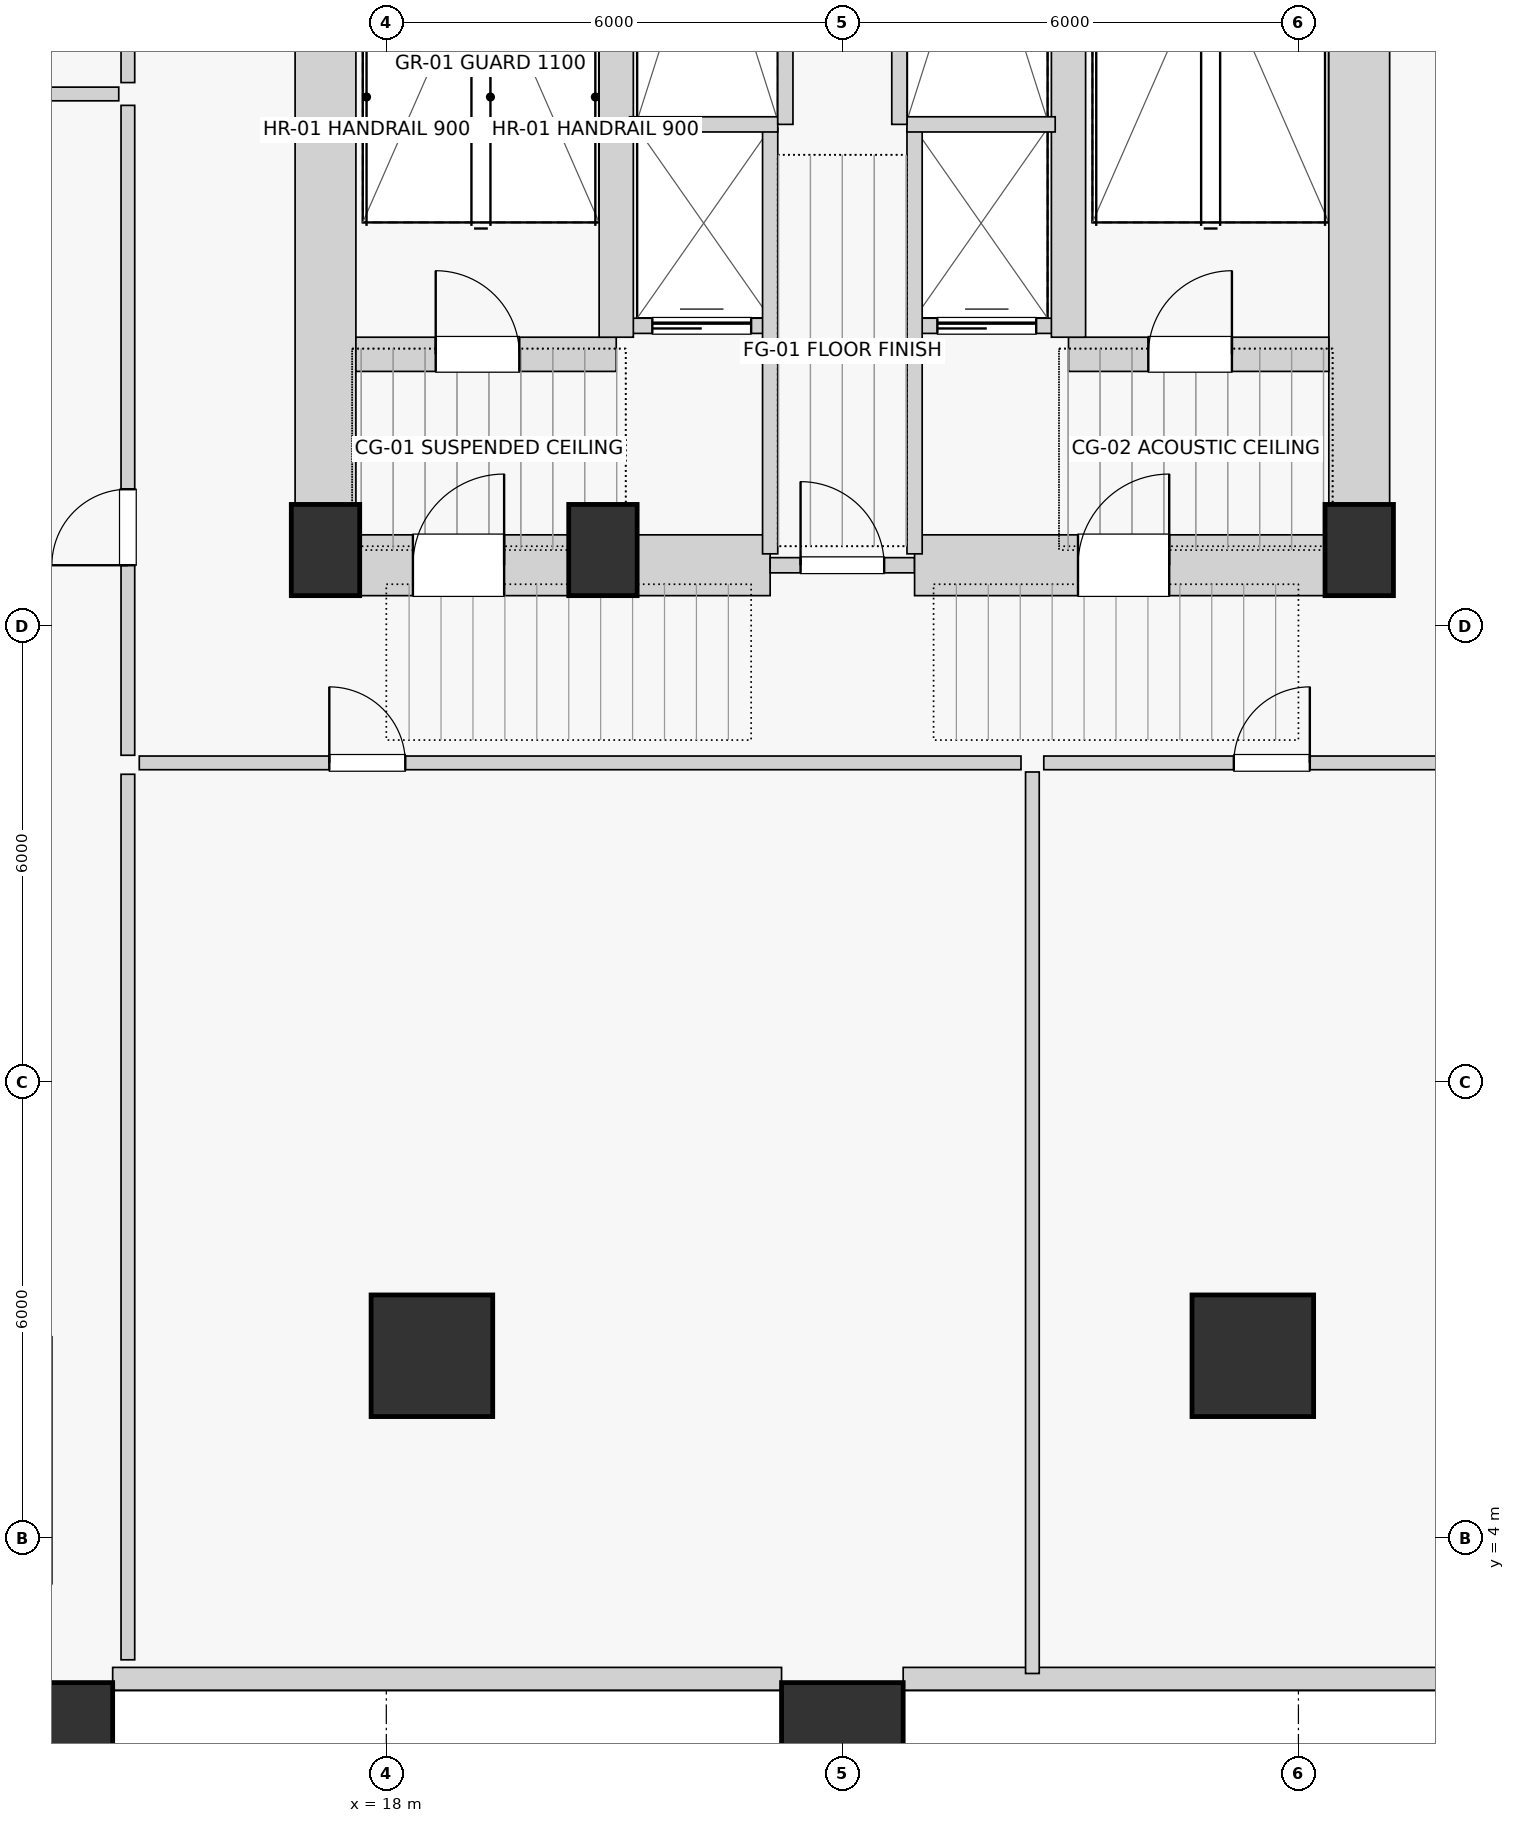
"""IFC4 building model, lengths in metres.
Left out: names, types, materials, properties, quantities, classifications, styles, units other than length and angle.
Written with IfcOpenShell. Run it as: python <this file> out.ifc"""

import sys

from ifc_helpers import new_model, si_unit, direction, frame, frame_2d, origin, origin_2d, place, context, subcontext, project, spatial, rectangle, extrude, source, transform, mapped, element, fill, save


model = new_model("IFC4")
c1 = context("Model", 3, precision=1e-05, world=origin(), true_north=direction((0.0, 1.0)))
c2 = subcontext(c1, "Body", "Model", "MODEL_VIEW")
j1 = project(units=[si_unit("LENGTHUNIT", "METRE"), si_unit("PLANEANGLEUNIT", "RADIAN")], contexts=[c1])
p1 = place(None, origin())
s1 = spatial("IfcSite", under=j1, at=p1, CompositionType="ELEMENT")
p2 = place(p1, origin())
s2 = spatial("IfcBuilding", under=s1, at=p2, CompositionType="ELEMENT")
p3 = place(p2, frame((0.0, 0.0, 18.4)))
s3 = spatial("IfcBuildingStorey", under=s2, at=p3, CompositionType="ELEMENT", Elevation=18.4)
for number, where, z_axis, x_axis in (
    (1, (17.2, 17.0, 0.0), (0.0, 0.0, 1.0), (1.0, 0.0, 0.0)),
    (2, (20.85, 17.0, 0.0), (0.0, 0.0, 1.0), (1.0, 0.0, 0.0)),
    (3, (30.8, 17.0, 0.0), (0.0, 0.0, 1.0), (1.0, 0.0, 0.0)),
):
    element("IfcColumn", number, at=place(p3, frame(where, z_axis=z_axis, x_axis=x_axis)), inside=s3, PredefinedType="PILASTER", context=c2, shape_type="SweptSolid", body=[
        extrude(rectangle(XDim=0.9, YDim=1.2, at=origin_2d()), origin(), (0.0, 0.0, 1.0), 4.4),
    ])
for number, where, z_axis, x_axis in (
    (4, (13.6, 1.3, 0.0), (0.0, 0.0, 1.0), (1.0, 0.0, 0.0)),
    (5, (24.0, 1.3, 0.0), (0.0, 0.0, 1.0), (1.0, 0.0, 0.0)),
    (6, (18.6, 6.4, 0.0), (0.0, 0.0, 1.0), (1.0, 0.0, 0.0)),
    (7, (29.4, 6.4, 0.0), (0.0, 0.0, 1.0), (1.0, 0.0, 0.0)),
):
    element("IfcColumn", number, at=place(p3, frame(where, z_axis=z_axis, x_axis=x_axis)), inside=s3, PredefinedType="COLUMN", context=c2, shape_type="SweptSolid", body=[
        extrude(rectangle(XDim=1.6, YDim=1.6, at=origin_2d()), origin(), (0.0, 0.0, 1.0), 4.4),
    ])
p4 = place(p3, frame((14.4, 2.15, 0.0), z_axis=(0.0, 0.0, 1.0), x_axis=(1.0, 0.0, 0.0)))
e8 = element("IfcWall", 8, at=p4, inside=s3, PredefinedType="SOLIDWALL", context=c2, shape_type="SweptSolid", body=[
    extrude(rectangle(XDim=8.8, YDim=0.3, at=frame_2d((4.4, 0.0))), origin(), (0.0, 0.0, 1.0), 2.95),
])
p5 = place(p4, frame((3.35, 0.0, 0.85)))
e9 = element("IfcOpeningElement", 9, at=p5, cuts=e8, PredefinedType="OPENING", context=c2, shape_type="SweptSolid", body=[
    extrude(rectangle(XDim=2.1, YDim=1.75, at=frame_2d((1.05, 0.875))), frame((0.0, 0.16, 0.0), z_axis=(0.0, -1.0, 0.0), x_axis=(1.0, 0.0, 0.0)), (0.0, 0.0, 1.0), 0.32),
])
p6 = place(p3, frame((24.8, 2.15, 0.0), z_axis=(0.0, 0.0, 1.0), x_axis=(1.0, 0.0, 0.0)))
e10 = element("IfcWall", 10, at=p6, inside=s3, PredefinedType="SOLIDWALL", context=c2, shape_type="SweptSolid", body=[
    extrude(rectangle(XDim=8.8, YDim=0.3, at=frame_2d((4.4, 0.0))), origin(), (0.0, 0.0, 1.0), 2.95),
])
p7 = place(p6, frame((3.35, 0.0, 0.85)))
e11 = element("IfcOpeningElement", 11, at=p7, cuts=e10, PredefinedType="OPENING", context=c2, shape_type="SweptSolid", body=[
    extrude(rectangle(XDim=2.1, YDim=1.75, at=frame_2d((1.05, 0.875))), frame((0.0, 0.16, 0.0), z_axis=(0.0, -1.0, 0.0), x_axis=(1.0, 0.0, 0.0)), (0.0, 0.0, 1.0), 0.32),
])
for number, where, z_axis, x_axis in (
    (12, (17.2, 16.8, 0.0), (0.0, 0.0, 1.0), (0.0, 1.0, 0.0)),
    (13, (30.8, 16.8, 0.0), (0.0, 0.0, 1.0), (0.0, 1.0, 0.0)),
):
    element("IfcWall", number, at=place(p3, frame(where, z_axis=z_axis, x_axis=x_axis)), inside=s3, PredefinedType="SHEAR", context=c2, shape_type="SweptSolid", body=[
        extrude(rectangle(XDim=14.2, YDim=0.8, at=frame_2d((7.1, 0.0))), origin(), (0.0, 0.0, 1.0), 4.05),
    ])
p8 = place(p3, frame((17.2, 16.8, 0.0), z_axis=(0.0, 0.0, 1.0), x_axis=(1.0, 0.0, 0.0)))
e14 = element("IfcWall", 14, at=p8, inside=s3, PredefinedType="SHEAR", context=c2, shape_type="SweptSolid", body=[
    extrude(rectangle(XDim=5.85, YDim=0.8, at=frame_2d((2.925, 0.0))), origin(), (0.0, 0.0, 1.0), 4.05),
])
p9 = place(p8, frame((1.15, 0.0, 0.0)))
e15 = element("IfcOpeningElement", 15, at=p9, cuts=e14, PredefinedType="OPENING", context=c2, shape_type="SweptSolid", body=[
    extrude(rectangle(XDim=1.2, YDim=2.03, at=frame_2d((0.6, 1.015))), frame((0.0, 0.41, 0.0), z_axis=(0.0, -1.0, 0.0), x_axis=(1.0, 0.0, 0.0)), (0.0, 0.0, 1.0), 0.82),
])
p10 = place(p3, frame((23.05, 16.8, 0.0), z_axis=(0.0, 0.0, 1.0), x_axis=(1.0, 0.0, 0.0)))
e16 = element("IfcWall", 16, at=p10, inside=s3, PredefinedType="SOLIDWALL", context=c2, shape_type="SweptSolid", body=[
    extrude(rectangle(XDim=1.9, YDim=0.2, at=frame_2d((0.95, 0.0))), origin(), (0.0, 0.0, 1.0), 3.2),
])
p11 = place(p10, frame((0.4, 0.0, 0.0)))
e17 = element("IfcOpeningElement", 17, at=p11, cuts=e16, PredefinedType="OPENING", context=c2, shape_type="SweptSolid", body=[
    extrude(rectangle(XDim=1.1, YDim=2.03, at=frame_2d((0.55, 1.015))), frame((0.0, 0.11, 0.0), z_axis=(0.0, -1.0, 0.0), x_axis=(1.0, 0.0, 0.0)), (0.0, 0.0, 1.0), 0.22),
])
p12 = place(p3, frame((24.95, 16.8, 0.0), z_axis=(0.0, 0.0, 1.0), x_axis=(1.0, 0.0, 0.0)))
e18 = element("IfcWall", 18, at=p12, inside=s3, PredefinedType="SHEAR", context=c2, shape_type="SweptSolid", body=[
    extrude(rectangle(XDim=5.85, YDim=0.8, at=frame_2d((2.925, 0.0))), origin(), (0.0, 0.0, 1.0), 4.05),
])
p13 = place(p12, frame((2.15, 0.0, 0.0)))
e19 = element("IfcOpeningElement", 19, at=p13, cuts=e18, PredefinedType="OPENING", context=c2, shape_type="SweptSolid", body=[
    extrude(rectangle(XDim=1.2, YDim=2.03, at=frame_2d((0.6, 1.015))), frame((0.0, 0.41, 0.0), z_axis=(0.0, -1.0, 0.0), x_axis=(1.0, 0.0, 0.0)), (0.0, 0.0, 1.0), 0.82),
])
p14 = place(p3, frame((17.6, 19.575, 0.0), z_axis=(0.0, 0.0, 1.0), x_axis=(1.0, 0.0, 0.0)))
e20 = element("IfcWall", 20, at=p14, inside=s3, PredefinedType="SHEAR", context=c2, shape_type="SweptSolid", body=[
    extrude(rectangle(XDim=3.425, YDim=0.45, at=frame_2d((1.712, 0.0))), origin(), (0.0, 0.0, 1.0), 4.05),
])
p15 = place(p14, frame((1.05, 0.0, 0.0)))
e21 = element("IfcOpeningElement", 21, at=p15, cuts=e20, PredefinedType="OPENING", context=c2, shape_type="SweptSolid", body=[
    extrude(rectangle(XDim=1.1, YDim=2.03, at=frame_2d((0.55, 1.015))), frame((0.0, 0.235, 0.0), z_axis=(0.0, -1.0, 0.0), x_axis=(1.0, 0.0, 0.0)), (0.0, 0.0, 1.0), 0.47),
])
p16 = place(p3, frame((21.2, 19.95, 0.0), z_axis=(0.0, 0.0, 1.0), x_axis=(1.0, 0.0, 0.0)))
e22 = element("IfcWall", 22, at=p16, inside=s3, PredefinedType="SOLIDWALL", context=c2, shape_type="SweptSolid", body=[
    extrude(rectangle(XDim=1.85, YDim=0.2, at=frame_2d((0.925, 0.0))), origin(), (0.0, 0.0, 1.0), 4.05),
])
p17 = place(p16, frame((0.3, 0.0, 0.0)))
e23 = element("IfcOpeningElement", 23, at=p17, cuts=e22, PredefinedType="OPENING", context=c2, shape_type="SweptSolid", body=[
    extrude(rectangle(XDim=1.3, YDim=2.25, at=frame_2d((0.65, 1.125))), frame((0.0, 0.11, 0.0), z_axis=(0.0, -1.0, 0.0), x_axis=(1.0, 0.0, 0.0)), (0.0, 0.0, 1.0), 0.22),
])
p18 = place(p3, frame((24.95, 19.95, 0.0), z_axis=(0.0, 0.0, 1.0), x_axis=(1.0, 0.0, 0.0)))
e24 = element("IfcWall", 24, at=p18, inside=s3, PredefinedType="SOLIDWALL", context=c2, shape_type="SweptSolid", body=[
    extrude(rectangle(XDim=1.85, YDim=0.2, at=frame_2d((0.925, 0.0))), origin(), (0.0, 0.0, 1.0), 4.05),
])
p19 = place(p18, frame((0.3, 0.0, 0.0)))
e25 = element("IfcOpeningElement", 25, at=p19, cuts=e24, PredefinedType="OPENING", context=c2, shape_type="SweptSolid", body=[
    extrude(rectangle(XDim=1.3, YDim=2.25, at=frame_2d((0.65, 1.125))), frame((0.0, 0.11, 0.0), z_axis=(0.0, -1.0, 0.0), x_axis=(1.0, 0.0, 0.0)), (0.0, 0.0, 1.0), 0.22),
])
p20 = place(p3, frame((26.975, 19.575, 0.0), z_axis=(0.0, 0.0, 1.0), x_axis=(1.0, 0.0, 0.0)))
e26 = element("IfcWall", 26, at=p20, inside=s3, PredefinedType="SHEAR", context=c2, shape_type="SweptSolid", body=[
    extrude(rectangle(XDim=3.425, YDim=0.45, at=frame_2d((1.712, 0.0))), origin(), (0.0, 0.0, 1.0), 4.05),
])
p21 = place(p20, frame((1.05, 0.0, 0.0)))
e27 = element("IfcOpeningElement", 27, at=p21, cuts=e26, PredefinedType="OPENING", context=c2, shape_type="SweptSolid", body=[
    extrude(rectangle(XDim=1.1, YDim=2.03, at=frame_2d((0.55, 1.015))), frame((0.0, 0.235, 0.0), z_axis=(0.0, -1.0, 0.0), x_axis=(1.0, 0.0, 0.0)), (0.0, 0.0, 1.0), 0.47),
])
for number, where, z_axis, x_axis in (
    (28, (21.025, 19.8, 0.0), (0.0, 0.0, 1.0), (0.0, 1.0, 0.0)),
    (29, (26.975, 19.8, 0.0), (0.0, 0.0, 1.0), (0.0, 1.0, 0.0)),
):
    element("IfcWall", number, at=place(p3, frame(where, z_axis=z_axis, x_axis=x_axis)), inside=s3, PredefinedType="SHEAR", context=c2, shape_type="SweptSolid", body=[
        extrude(rectangle(XDim=8.825, YDim=0.45, at=frame_2d((4.413, 0.0))), origin(), (0.0, 0.0, 1.0), 4.05),
    ])
for number, where, z_axis, x_axis in (
    (30, (23.05, 16.95, 0.0), (0.0, 0.0, 1.0), (0.0, 1.0, 0.0)),
    (31, (24.95, 16.95, 0.0), (0.0, 0.0, 1.0), (0.0, 1.0, 0.0)),
):
    element("IfcWall", number, at=place(p3, frame(where, z_axis=z_axis, x_axis=x_axis)), inside=s3, PredefinedType="SOLIDWALL", context=c2, shape_type="SweptSolid", body=[
        extrude(rectangle(XDim=5.6, YDim=0.2, at=frame_2d((2.8, 0.0))), origin(), (0.0, 0.0, 1.0), 4.05),
    ])
for number, where, z_axis, x_axis in (
    (32, (21.2, 22.6, 0.0), (0.0, 0.0, 1.0), (1.0, 0.0, 0.0)),
    (33, (24.85, 22.6, 0.0), (0.0, 0.0, 1.0), (1.0, 0.0, 0.0)),
):
    element("IfcWall", number, at=place(p3, frame(where, z_axis=z_axis, x_axis=x_axis)), inside=s3, PredefinedType="SOLIDWALL", context=c2, shape_type="SweptSolid", body=[
        extrude(rectangle(XDim=1.95, YDim=0.2, at=frame_2d((0.975, 0.0))), origin(), (0.0, 0.0, 1.0), 4.05),
    ])
for number, where, z_axis, x_axis in (
    (34, (23.25, 22.6, 0.0), (0.0, 0.0, 1.0), (0.0, 1.0, 0.0)),
    (35, (24.75, 22.6, 0.0), (0.0, 0.0, 1.0), (0.0, 1.0, 0.0)),
):
    element("IfcWall", number, at=place(p3, frame(where, z_axis=z_axis, x_axis=x_axis)), inside=s3, PredefinedType="SOLIDWALL", context=c2, shape_type="SweptSolid", body=[
        extrude(rectangle(XDim=5.95, YDim=0.2, at=frame_2d((2.975, 0.0))), origin(), (0.0, 0.0, 1.0), 4.05),
    ])
p22 = place(p3, frame((14.6, 14.3, 0.0), z_axis=(0.0, 0.0, 1.0), x_axis=(0.0, 1.0, 0.0)))
e36 = element("IfcWall", 36, at=p22, inside=s3, PredefinedType="PARTITIONING", context=c2, shape_type="SweptSolid", body=[
    extrude(rectangle(XDim=8.55, YDim=0.18, at=frame_2d((4.275, 0.0))), origin(), (0.0, 0.0, 1.0), 4.05),
])
p23 = place(p22, frame((2.5, 0.0, 0.0)))
e37 = element("IfcOpeningElement", 37, at=p23, cuts=e36, PredefinedType="OPENING", context=c2, shape_type="SweptSolid", body=[
    extrude(rectangle(XDim=1.0, YDim=2.01, at=frame_2d((0.5, 1.005))), frame((0.0, 0.1, 0.0), z_axis=(0.0, -1.0, 0.0), x_axis=(1.0, 0.0, 0.0)), (0.0, 0.0, 1.0), 0.2),
])
p24 = place(p3, frame((14.6, 23.15, 0.0), z_axis=(0.0, 0.0, 1.0), x_axis=(0.0, 1.0, 0.0)))
e38 = element("IfcWall", 38, at=p24, inside=s3, PredefinedType="PARTITIONING", context=c2, shape_type="SweptSolid", body=[
    extrude(rectangle(XDim=10.35, YDim=0.18, at=frame_2d((5.175, 0.0))), origin(), (0.0, 0.0, 1.0), 4.05),
])
p25 = place(p24, frame((2.5, 0.0, 0.0)))
e39 = element("IfcOpeningElement", 39, at=p25, cuts=e38, PredefinedType="OPENING", context=c2, shape_type="SweptSolid", body=[
    extrude(rectangle(XDim=1.0, YDim=2.01, at=frame_2d((0.5, 1.005))), frame((0.0, 0.1, 0.0), z_axis=(0.0, -1.0, 0.0), x_axis=(1.0, 0.0, 0.0)), (0.0, 0.0, 1.0), 0.2),
])
p26 = place(p3, frame((2.22, 23.0, 0.0), z_axis=(0.0, 0.0, 1.0), x_axis=(1.0, 0.0, 0.0)))
e40 = element("IfcWall", 40, at=p26, inside=s3, PredefinedType="PARTITIONING", context=c2, shape_type="SweptSolid", body=[
    extrude(rectangle(XDim=12.26, YDim=0.18, at=frame_2d((6.13, 0.0))), origin(), (0.0, 0.0, 1.0), 4.05),
])
p27 = place(p3, frame((14.6, 2.4, 0.0), z_axis=(0.0, 0.0, 1.0), x_axis=(0.0, 1.0, 0.0)))
e41 = element("IfcWall", 41, at=p27, inside=s3, PredefinedType="PARTITIONING", context=c2, shape_type="SweptSolid", body=[
    extrude(rectangle(XDim=11.65, YDim=0.18, at=frame_2d((5.825, 0.0))), origin(), (0.0, 0.0, 1.0), 4.05),
])
p28 = place(p3, frame((14.75, 14.2, 0.0), z_axis=(0.0, 0.0, 1.0), x_axis=(1.0, 0.0, 0.0)))
e42 = element("IfcWall", 42, at=p28, inside=s3, PredefinedType="PARTITIONING", context=c2, shape_type="SweptSolid", body=[
    extrude(rectangle(XDim=11.6, YDim=0.18, at=frame_2d((5.8, 0.0))), origin(), (0.0, 0.0, 1.0), 4.05),
])
p29 = place(p28, frame((2.5, 0.0, 0.0)))
e43 = element("IfcOpeningElement", 43, at=p29, cuts=e42, PredefinedType="OPENING", context=c2, shape_type="SweptSolid", body=[
    extrude(rectangle(XDim=1.0, YDim=2.01, at=frame_2d((0.5, 1.005))), frame((0.0, 0.1, 0.0), z_axis=(0.0, -1.0, 0.0), x_axis=(1.0, 0.0, 0.0)), (0.0, 0.0, 1.0), 0.2),
])
p30 = place(p3, frame((26.65, 14.2, 0.0), z_axis=(0.0, 0.0, 1.0), x_axis=(1.0, 0.0, 0.0)))
e44 = element("IfcWall", 44, at=p30, inside=s3, PredefinedType="PARTITIONING", context=c2, shape_type="SweptSolid", body=[
    extrude(rectangle(XDim=6.6, YDim=0.18, at=frame_2d((3.3, 0.0))), origin(), (0.0, 0.0, 1.0), 4.05),
])
p31 = place(p30, frame((2.5, 0.0, 0.0)))
e45 = element("IfcOpeningElement", 45, at=p31, cuts=e44, PredefinedType="OPENING", context=c2, shape_type="SweptSolid", body=[
    extrude(rectangle(XDim=1.0, YDim=2.01, at=frame_2d((0.5, 1.005))), frame((0.0, 0.1, 0.0), z_axis=(0.0, -1.0, 0.0), x_axis=(1.0, 0.0, 0.0)), (0.0, 0.0, 1.0), 0.2),
])
p32 = place(p3, frame((26.5, 2.22, 0.0), z_axis=(0.0, 0.0, 1.0), x_axis=(0.0, 1.0, 0.0)))
e46 = element("IfcWall", 46, at=p32, inside=s3, PredefinedType="PARTITIONING", context=c2, shape_type="SweptSolid", body=[
    extrude(rectangle(XDim=11.86, YDim=0.18, at=frame_2d((5.93, 0.0))), origin(), (0.0, 0.0, 1.0), 4.05),
])
m1 = source(origin(), c2, "Body", "SweptSolid", [
    extrude(rectangle(XDim=2.1, YDim=1.75, at=frame_2d((1.05, 0.875))), frame((0.0, 0.03, 0.0), z_axis=(0.0, -1.0, 0.0), x_axis=(1.0, 0.0, 0.0)), (0.0, 0.0, 1.0), 0.06),
])
p33 = place(p5, origin())
e47 = element("IfcWindow", 47, at=p33, inside=s3, PartitioningType="DOUBLE_PANEL_VERTICAL", PredefinedType="WINDOW", context=c2, shape_type="MappedRepresentation", body=[
    mapped(m1, transform((0.0, 0.0, 0.0), scale=1.0)),
])
fill(e9, e47)
p34 = place(p7, origin())
e48 = element("IfcWindow", 48, at=p34, inside=s3, PartitioningType="DOUBLE_PANEL_VERTICAL", PredefinedType="WINDOW", context=c2, shape_type="MappedRepresentation", body=[
    mapped(m1, transform((0.0, 0.0, 0.0), scale=1.0)),
])
fill(e11, e48)
m2 = source(origin(), c2, "Body", "SweptSolid", [
    extrude(rectangle(XDim=1.2, YDim=2.03, at=frame_2d((0.6, 1.015))), frame((0.0, 0.025, 0.0), z_axis=(0.0, -1.0, 0.0), x_axis=(1.0, 0.0, 0.0)), (0.0, 0.0, 1.0), 0.05),
])
p35 = place(p9, origin())
e49 = element("IfcDoor", 49, at=p35, inside=s3, OperationType="SINGLE_SWING_RIGHT", PredefinedType="DOOR", context=c2, shape_type="MappedRepresentation", body=[
    mapped(m2, transform((0.0, 0.0, 0.0), scale=1.0)),
])
fill(e15, e49)
m3 = source(origin(), c2, "Body", "SweptSolid", [
    extrude(rectangle(XDim=1.1, YDim=2.03, at=frame_2d((0.55, 1.015))), frame((0.0, 0.025, 0.0), z_axis=(0.0, -1.0, 0.0), x_axis=(1.0, 0.0, 0.0)), (0.0, 0.0, 1.0), 0.05),
])
p36 = place(p11, origin())
e50 = element("IfcDoor", 50, at=p36, inside=s3, OperationType="SINGLE_SWING_LEFT", PredefinedType="DOOR", context=c2, shape_type="MappedRepresentation", body=[
    mapped(m3, transform((0.0, 0.0, 0.0), scale=1.0)),
])
fill(e17, e50)
p37 = place(p13, origin())
e51 = element("IfcDoor", 51, at=p37, inside=s3, OperationType="SINGLE_SWING_RIGHT", PredefinedType="DOOR", context=c2, shape_type="MappedRepresentation", body=[
    mapped(m2, transform((0.0, 0.0, 0.0), scale=1.0)),
])
fill(e19, e51)
p38 = place(p15, origin())
e52 = element("IfcDoor", 52, at=p38, inside=s3, OperationType="SINGLE_SWING_LEFT", PredefinedType="DOOR", context=c2, shape_type="MappedRepresentation", body=[
    mapped(m3, transform((0.0, 0.0, 0.0), scale=1.0)),
])
fill(e21, e52)
m4 = source(origin(), c2, "Body", "SweptSolid", [
    extrude(rectangle(XDim=1.3, YDim=2.25, at=frame_2d((0.65, 1.125))), frame((0.0, 0.025, 0.0), z_axis=(0.0, -1.0, 0.0), x_axis=(1.0, 0.0, 0.0)), (0.0, 0.0, 1.0), 0.05),
])
p39 = place(p17, origin())
e53 = element("IfcDoor", 53, at=p39, inside=s3, OperationType="SLIDING_TO_LEFT", PredefinedType="DOOR", context=c2, shape_type="MappedRepresentation", body=[
    mapped(m4, transform((0.0, 0.0, 0.0), scale=1.0)),
])
fill(e23, e53)
p40 = place(p19, origin())
e54 = element("IfcDoor", 54, at=p40, inside=s3, OperationType="SLIDING_TO_LEFT", PredefinedType="DOOR", context=c2, shape_type="MappedRepresentation", body=[
    mapped(m4, transform((0.0, 0.0, 0.0), scale=1.0)),
])
fill(e25, e54)
p41 = place(p21, origin())
e55 = element("IfcDoor", 55, at=p41, inside=s3, OperationType="SINGLE_SWING_RIGHT", PredefinedType="DOOR", context=c2, shape_type="MappedRepresentation", body=[
    mapped(m3, transform((0.0, 0.0, 0.0), scale=1.0)),
])
fill(e27, e55)
m5 = source(origin(), c2, "Body", "SweptSolid", [
    extrude(rectangle(XDim=1.0, YDim=2.01, at=frame_2d((0.5, 1.005))), frame((0.0, 0.025, 0.0), z_axis=(0.0, -1.0, 0.0), x_axis=(1.0, 0.0, 0.0)), (0.0, 0.0, 1.0), 0.05),
])
p42 = place(p23, origin())
e56 = element("IfcDoor", 56, at=p42, inside=s3, OperationType="SINGLE_SWING_LEFT", PredefinedType="DOOR", context=c2, shape_type="MappedRepresentation", body=[
    mapped(m5, transform((0.0, 0.0, 0.0), scale=1.0)),
])
fill(e37, e56)
p43 = place(p29, origin())
e57 = element("IfcDoor", 57, at=p43, inside=s3, OperationType="SINGLE_SWING_LEFT", PredefinedType="DOOR", context=c2, shape_type="MappedRepresentation", body=[
    mapped(m5, transform((0.0, 0.0, 0.0), scale=1.0)),
])
fill(e43, e57)
p44 = place(p31, origin())
e58 = element("IfcDoor", 58, at=p44, inside=s3, OperationType="SINGLE_SWING_RIGHT", PredefinedType="DOOR", context=c2, shape_type="MappedRepresentation", body=[
    mapped(m5, transform((0.0, 0.0, 0.0), scale=1.0)),
])
fill(e45, e58)
save(model, sys.argv[1])
